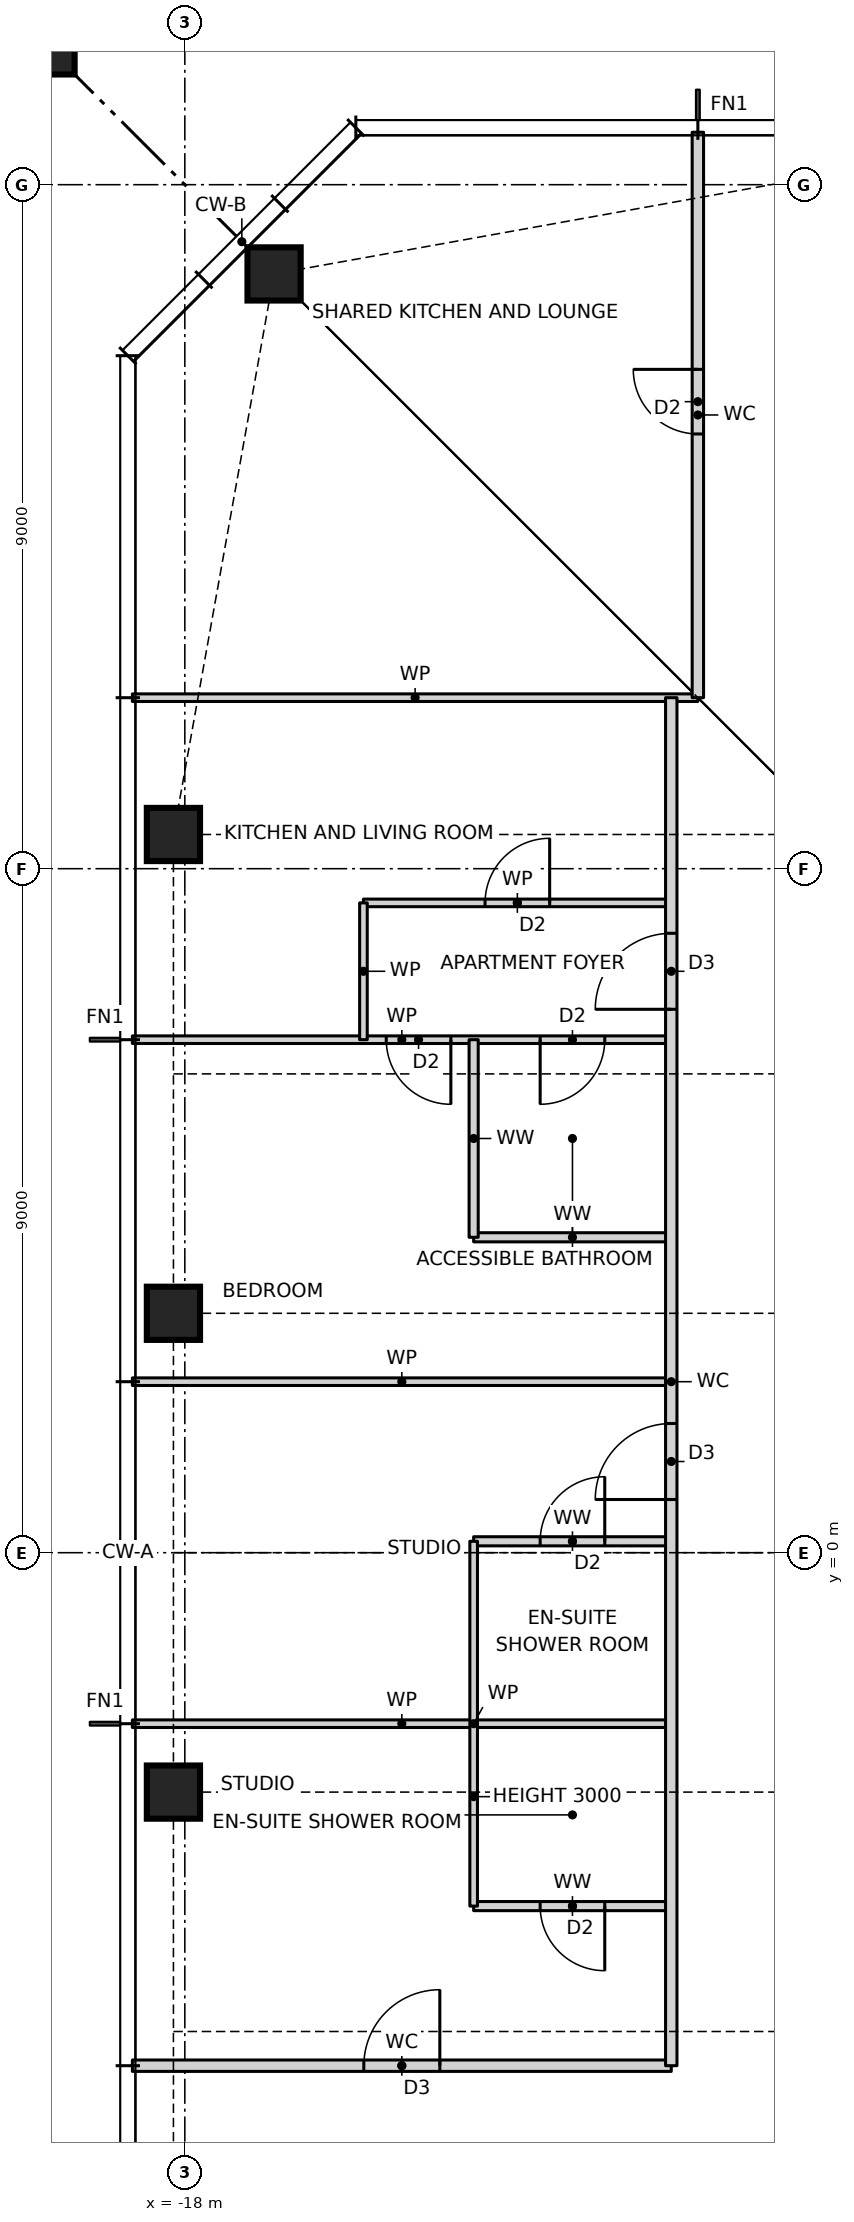
"""IFC4 building model, lengths in metres.
Left out: names, types, materials, properties, quantities, classifications, styles, units other than length and angle.
Written with IfcOpenShell. Run it as: python <this file> out.ifc"""

import sys

from ifc_helpers import new_model, si_unit, direction, frame, frame_2d, origin, origin_2d, place, context, subcontext, project, spatial, rectangle, hollow_rectangle, i_section, extrude, element, fill, save


model = new_model("IFC4")
c1 = context("Model", 3, precision=1e-05, world=origin(), true_north=direction((0.0, 1.0)))
c2 = subcontext(c1, "Body", "Model", "MODEL_VIEW")
j1 = project(units=[si_unit("LENGTHUNIT", "METRE"), si_unit("PLANEANGLEUNIT", "RADIAN")], contexts=[c1])
p1 = place(None, origin())
s1 = spatial("IfcSite", under=j1, at=p1, CompositionType="ELEMENT")
p2 = place(p1, origin())
s2 = spatial("IfcBuilding", under=s1, at=p2, CompositionType="ELEMENT")
p3 = place(p2, frame((0.0, 0.0, 202.0)))
s3 = spatial("IfcBuildingStorey", under=s2, at=p3, CompositionType="ELEMENT", Elevation=202.0)
for number, where, z_axis, x_axis in (
    (1, (-16.826, 16.826, 0.0), (0.0, 0.0, 1.0), (1.0, 0.0, 0.0)),
    (2, (-18.15, 9.45, 0.0), (0.0, 0.0, 1.0), (1.0, 0.0, 0.0)),
    (3, (-18.15, 3.15, 0.0), (0.0, 0.0, 1.0), (1.0, 0.0, 0.0)),
    (4, (-18.15, -3.15, 0.0), (0.0, 0.0, 1.0), (1.0, 0.0, 0.0)),
):
    element("IfcColumn", number, at=place(p3, frame(where, z_axis=z_axis, x_axis=x_axis)), inside=s3, PredefinedType="COLUMN", context=c2, shape_type="SweptSolid", body=[
        extrude(hollow_rectangle(XDim=0.7, YDim=0.7, WallThickness=0.06, at=origin_2d()), origin(), (0.0, 0.0, 1.0), 3.5),
    ])
p4 = place(p3, frame((-21.65, 21.65, 0.0), z_axis=(0.0, 0.0, 1.0), x_axis=(1.0, 0.0, 0.0)))
e5 = element("IfcColumn", 5, at=p4, inside=s3, PredefinedType="COLUMN", context=c2, shape_type="SweptSolid", body=[
    extrude(rectangle(XDim=4.4, YDim=4.4, at=origin_2d()), origin(), (0.0, 0.0, 1.0), 3.5),
    extrude(i_section(OverallWidth=0.478, OverallDepth=0.599, WebThickness=0.1, FlangeThickness=0.14, at=origin_2d()), origin(), (0.0, 0.0, 1.0), 3.5),
])
p5 = place(p3, frame((-18.69, -6.75, 0.0), z_axis=(0.0, 0.0, 1.0), x_axis=(1.0, 0.0, 0.0)))
e6 = element("IfcWall", 6, at=p5, inside=s3, PredefinedType="PARTITIONING", context=c2, shape_type="SweptSolid", body=[
    extrude(rectangle(XDim=7.09, YDim=0.15, at=frame_2d((3.545, 0.0))), origin(), (0.0, 0.0, 1.0), 3.27),
])
p6 = place(p5, frame((3.045, 0.0, 0.0)))
e7 = element("IfcOpeningElement", 7, at=p6, cuts=e6, PredefinedType="OPENING", context=c2, shape_type="SweptSolid", body=[
    extrude(rectangle(XDim=1.0, YDim=2.1, at=frame_2d((0.5, 1.05))), frame((0.0, 0.085, 0.0), z_axis=(0.0, -1.0, 0.0), x_axis=(1.0, 0.0, 0.0)), (0.0, 0.0, 1.0), 0.17),
])
p7 = place(p3, frame((-14.2, -4.65, 0.0), z_axis=(0.0, 0.0, 1.0), x_axis=(1.0, 0.0, 0.0)))
e8 = element("IfcWall", 8, at=p7, inside=s3, PredefinedType="PARTITIONING", context=c2, shape_type="SweptSolid", body=[
    extrude(rectangle(XDim=2.6, YDim=0.12, at=frame_2d((1.3, 0.0))), origin(), (0.0, 0.0, 1.0), 3.27),
])
p8 = place(p7, frame((0.875, 0.0, 0.0)))
e9 = element("IfcOpeningElement", 9, at=p8, cuts=e8, PredefinedType="OPENING", context=c2, shape_type="SweptSolid", body=[
    extrude(rectangle(XDim=0.85, YDim=2.1, at=frame_2d((0.425, 1.05))), frame((0.0, 0.07, 0.0), z_axis=(0.0, -1.0, 0.0), x_axis=(1.0, 0.0, 0.0)), (0.0, 0.0, 1.0), 0.14),
])
p9 = place(p3, frame((-18.69, -2.25, 0.0), z_axis=(0.0, 0.0, 1.0), x_axis=(1.0, 0.0, 0.0)))
e10 = element("IfcWall", 10, at=p9, inside=s3, PredefinedType="PARTITIONING", context=c2, shape_type="SweptSolid", body=[
    extrude(rectangle(XDim=7.09, YDim=0.1, at=frame_2d((3.545, 0.0))), origin(), (0.0, 0.0, 1.0), 3.27),
])
p10 = place(p3, frame((-14.2, 0.15, 0.0), z_axis=(0.0, 0.0, 1.0), x_axis=(1.0, 0.0, 0.0)))
e11 = element("IfcWall", 11, at=p10, inside=s3, PredefinedType="PARTITIONING", context=c2, shape_type="SweptSolid", body=[
    extrude(rectangle(XDim=2.6, YDim=0.12, at=frame_2d((1.3, 0.0))), origin(), (0.0, 0.0, 1.0), 3.27),
])
p11 = place(p10, frame((0.875, 0.0, 0.0)))
e12 = element("IfcOpeningElement", 12, at=p11, cuts=e11, PredefinedType="OPENING", context=c2, shape_type="SweptSolid", body=[
    extrude(rectangle(XDim=0.85, YDim=2.1, at=frame_2d((0.425, 1.05))), frame((0.0, 0.07, 0.0), z_axis=(0.0, -1.0, 0.0), x_axis=(1.0, 0.0, 0.0)), (0.0, 0.0, 1.0), 0.14),
])
p12 = place(p3, frame((-18.69, 2.25, 0.0), z_axis=(0.0, 0.0, 1.0), x_axis=(1.0, 0.0, 0.0)))
e13 = element("IfcWall", 13, at=p12, inside=s3, PredefinedType="PARTITIONING", context=c2, shape_type="SweptSolid", body=[
    extrude(rectangle(XDim=7.09, YDim=0.1, at=frame_2d((3.545, 0.0))), origin(), (0.0, 0.0, 1.0), 3.27),
])
p13 = place(p3, frame((-14.2, 4.15, 0.0), z_axis=(0.0, 0.0, 1.0), x_axis=(1.0, 0.0, 0.0)))
e14 = element("IfcWall", 14, at=p13, inside=s3, PredefinedType="PARTITIONING", context=c2, shape_type="SweptSolid", body=[
    extrude(rectangle(XDim=2.6, YDim=0.12, at=frame_2d((1.3, 0.0))), origin(), (0.0, 0.0, 1.0), 3.27),
])
p14 = place(p3, frame((-18.69, 6.75, 0.0), z_axis=(0.0, 0.0, 1.0), x_axis=(1.0, 0.0, 0.0)))
e15 = element("IfcWall", 15, at=p14, inside=s3, PredefinedType="PARTITIONING", context=c2, shape_type="SweptSolid", body=[
    extrude(rectangle(XDim=7.09, YDim=0.1, at=frame_2d((3.545, 0.0))), origin(), (0.0, 0.0, 1.0), 3.27),
])
p15 = place(p14, frame((3.34, 0.0, 0.0)))
e16 = element("IfcOpeningElement", 16, at=p15, cuts=e15, PredefinedType="OPENING", context=c2, shape_type="SweptSolid", body=[
    extrude(rectangle(XDim=0.85, YDim=2.1, at=frame_2d((0.425, 1.05))), frame((0.0, 0.06, 0.0), z_axis=(0.0, -1.0, 0.0), x_axis=(1.0, 0.0, 0.0)), (0.0, 0.0, 1.0), 0.12),
])
p16 = place(p14, frame((5.365, 0.0, 0.0)))
e17 = element("IfcOpeningElement", 17, at=p16, cuts=e15, PredefinedType="OPENING", context=c2, shape_type="SweptSolid", body=[
    extrude(rectangle(XDim=0.85, YDim=2.1, at=frame_2d((0.425, 1.05))), frame((0.0, 0.06, 0.0), z_axis=(0.0, -1.0, 0.0), x_axis=(1.0, 0.0, 0.0)), (0.0, 0.0, 1.0), 0.12),
])
p17 = place(p3, frame((-15.65, 8.55, 0.0), z_axis=(0.0, 0.0, 1.0), x_axis=(1.0, 0.0, 0.0)))
e18 = element("IfcWall", 18, at=p17, inside=s3, PredefinedType="PARTITIONING", context=c2, shape_type="SweptSolid", body=[
    extrude(rectangle(XDim=4.05, YDim=0.1, at=frame_2d((2.025, 0.0))), origin(), (0.0, 0.0, 1.0), 3.27),
])
p18 = place(p17, frame((1.6, 0.0, 0.0)))
e19 = element("IfcOpeningElement", 19, at=p18, cuts=e18, PredefinedType="OPENING", context=c2, shape_type="SweptSolid", body=[
    extrude(rectangle(XDim=0.85, YDim=2.1, at=frame_2d((0.425, 1.05))), frame((0.0, 0.06, 0.0), z_axis=(0.0, -1.0, 0.0), x_axis=(1.0, 0.0, 0.0)), (0.0, 0.0, 1.0), 0.12),
])
p19 = place(p3, frame((-18.69, 11.25, 0.0), z_axis=(0.0, 0.0, 1.0), x_axis=(1.0, 0.0, 0.0)))
e20 = element("IfcWall", 20, at=p19, inside=s3, PredefinedType="PARTITIONING", context=c2, shape_type="SweptSolid", body=[
    extrude(rectangle(XDim=7.44, YDim=0.1, at=frame_2d((3.72, 0.0))), origin(), (0.0, 0.0, 1.0), 3.27),
])
p20 = place(p3, frame((-11.25, 11.25, 0.0), z_axis=(0.0, 0.0, 1.0), x_axis=(0.0, 1.0, 0.0)))
e21 = element("IfcWall", 21, at=p20, inside=s3, PredefinedType="PARTITIONING", context=c2, shape_type="SweptSolid", body=[
    extrude(rectangle(XDim=7.44, YDim=0.15, at=frame_2d((3.72, 0.0))), origin(), (0.0, 0.0, 1.0), 3.27),
])
p21 = place(p20, frame((3.47, 0.0, 0.0)))
e22 = element("IfcOpeningElement", 22, at=p21, cuts=e21, PredefinedType="OPENING", context=c2, shape_type="SweptSolid", body=[
    extrude(rectangle(XDim=0.85, YDim=2.1, at=frame_2d((0.425, 1.05))), frame((0.0, 0.085, 0.0), z_axis=(0.0, -1.0, 0.0), x_axis=(1.0, 0.0, 0.0)), (0.0, 0.0, 1.0), 0.17),
])
p22 = place(p3, frame((-11.6, -6.75, 0.0), z_axis=(0.0, 0.0, 1.0), x_axis=(0.0, 1.0, 0.0)))
e23 = element("IfcWall", 23, at=p22, inside=s3, PredefinedType="PARTITIONING", context=c2, shape_type="SweptSolid", body=[
    extrude(rectangle(XDim=18.0, YDim=0.15, at=frame_2d((9.0, 0.0))), origin(), (0.0, 0.0, 1.0), 3.27),
])
p23 = place(p22, frame((13.9, 0.0, 0.0)))
e24 = element("IfcOpeningElement", 24, at=p23, cuts=e23, PredefinedType="OPENING", context=c2, shape_type="SweptSolid", body=[
    extrude(rectangle(XDim=1.0, YDim=2.1, at=frame_2d((0.5, 1.05))), frame((0.0, 0.085, 0.0), z_axis=(0.0, -1.0, 0.0), x_axis=(1.0, 0.0, 0.0)), (0.0, 0.0, 1.0), 0.17),
])
p24 = place(p22, frame((7.45, 0.0, 0.0)))
e25 = element("IfcOpeningElement", 25, at=p24, cuts=e23, PredefinedType="OPENING", context=c2, shape_type="SweptSolid", body=[
    extrude(rectangle(XDim=1.0, YDim=2.1, at=frame_2d((0.5, 1.05))), frame((0.0, 0.085, 0.0), z_axis=(0.0, -1.0, 0.0), x_axis=(1.0, 0.0, 0.0)), (0.0, 0.0, 1.0), 0.17),
])
p25 = place(p3, frame((-14.2, -4.65, 0.0), z_axis=(0.0, 0.0, 1.0), x_axis=(0.0, 1.0, 0.0)))
e26 = element("IfcWall", 26, at=p25, inside=s3, PredefinedType="PARTITIONING", context=c2, shape_type="SweptSolid", body=[
    extrude(rectangle(XDim=4.8, YDim=0.1, at=frame_2d((2.4, 0.0))), origin(), (0.0, 0.0, 1.0), 3.0),
])
p26 = place(p3, frame((-14.2, 4.15, 0.0), z_axis=(0.0, 0.0, 1.0), x_axis=(0.0, 1.0, 0.0)))
e27 = element("IfcWall", 27, at=p26, inside=s3, PredefinedType="PARTITIONING", context=c2, shape_type="SweptSolid", body=[
    extrude(rectangle(XDim=2.6, YDim=0.12, at=frame_2d((1.3, 0.0))), origin(), (0.0, 0.0, 1.0), 3.27),
])
p27 = place(p3, frame((-15.65, 6.75, 0.0), z_axis=(0.0, 0.0, 1.0), x_axis=(0.0, 1.0, 0.0)))
e28 = element("IfcWall", 28, at=p27, inside=s3, PredefinedType="PARTITIONING", context=c2, shape_type="SweptSolid", body=[
    extrude(rectangle(XDim=1.8, YDim=0.1, at=frame_2d((0.9, 0.0))), origin(), (0.0, 0.0, 1.0), 3.27),
])
p28 = place(p23, origin())
e29 = element("IfcDoor", 29, at=p28, inside=s3, OperationType="SINGLE_SWING_LEFT", PredefinedType="DOOR", context=c2, shape_type="SweptSolid", body=[
    extrude(rectangle(XDim=1.0, YDim=2.1, at=frame_2d((0.5, 1.05))), frame((0.0, 0.025, 0.0), z_axis=(0.0, -1.0, 0.0), x_axis=(1.0, 0.0, 0.0)), (0.0, 0.0, 1.0), 0.05),
])
fill(e24, e29)
p29 = place(p18, origin())
e30 = element("IfcDoor", 30, at=p29, inside=s3, OperationType="SINGLE_SWING_RIGHT", PredefinedType="DOOR", context=c2, shape_type="SweptSolid", body=[
    extrude(rectangle(XDim=0.85, YDim=2.1, at=frame_2d((0.425, 1.05))), frame((0.0, 0.025, 0.0), z_axis=(0.0, -1.0, 0.0), x_axis=(1.0, 0.0, 0.0)), (0.0, 0.0, 1.0), 0.05),
])
fill(e19, e30)
p30 = place(p15, frame((0.85, 0.0, 0.0), z_axis=(0.0, 0.0, 1.0), x_axis=(-1.0, 0.0, 0.0)))
e31 = element("IfcDoor", 31, at=p30, inside=s3, OperationType="SINGLE_SWING_LEFT", PredefinedType="DOOR", context=c2, shape_type="SweptSolid", body=[
    extrude(rectangle(XDim=0.85, YDim=2.1, at=frame_2d((0.425, 1.05))), frame((0.0, 0.025, 0.0), z_axis=(0.0, -1.0, 0.0), x_axis=(1.0, 0.0, 0.0)), (0.0, 0.0, 1.0), 0.05),
])
fill(e16, e31)
p31 = place(p16, frame((0.85, 0.0, 0.0), z_axis=(0.0, 0.0, 1.0), x_axis=(-1.0, 0.0, 0.0)))
e32 = element("IfcDoor", 32, at=p31, inside=s3, OperationType="SINGLE_SWING_RIGHT", PredefinedType="DOOR", context=c2, shape_type="SweptSolid", body=[
    extrude(rectangle(XDim=0.85, YDim=2.1, at=frame_2d((0.425, 1.05))), frame((0.0, 0.025, 0.0), z_axis=(0.0, -1.0, 0.0), x_axis=(1.0, 0.0, 0.0)), (0.0, 0.0, 1.0), 0.05),
])
fill(e17, e32)
p32 = place(p24, origin())
e33 = element("IfcDoor", 33, at=p32, inside=s3, OperationType="SINGLE_SWING_LEFT", PredefinedType="DOOR", context=c2, shape_type="SweptSolid", body=[
    extrude(rectangle(XDim=1.0, YDim=2.1, at=frame_2d((0.5, 1.05))), frame((0.0, 0.025, 0.0), z_axis=(0.0, -1.0, 0.0), x_axis=(1.0, 0.0, 0.0)), (0.0, 0.0, 1.0), 0.05),
])
fill(e25, e33)
p33 = place(p11, origin())
e34 = element("IfcDoor", 34, at=p33, inside=s3, OperationType="SINGLE_SWING_RIGHT", PredefinedType="DOOR", context=c2, shape_type="SweptSolid", body=[
    extrude(rectangle(XDim=0.85, YDim=2.1, at=frame_2d((0.425, 1.05))), frame((0.0, 0.025, 0.0), z_axis=(0.0, -1.0, 0.0), x_axis=(1.0, 0.0, 0.0)), (0.0, 0.0, 1.0), 0.05),
])
fill(e12, e34)
p34 = place(p6, origin())
e35 = element("IfcDoor", 35, at=p34, inside=s3, OperationType="SINGLE_SWING_RIGHT", PredefinedType="DOOR", context=c2, shape_type="SweptSolid", body=[
    extrude(rectangle(XDim=1.0, YDim=2.1, at=frame_2d((0.5, 1.05))), frame((0.0, 0.025, 0.0), z_axis=(0.0, -1.0, 0.0), x_axis=(1.0, 0.0, 0.0)), (0.0, 0.0, 1.0), 0.05),
])
fill(e7, e35)
p35 = place(p8, frame((0.85, 0.0, 0.0), z_axis=(0.0, 0.0, 1.0), x_axis=(-1.0, 0.0, 0.0)))
e36 = element("IfcDoor", 36, at=p35, inside=s3, OperationType="SINGLE_SWING_LEFT", PredefinedType="DOOR", context=c2, shape_type="SweptSolid", body=[
    extrude(rectangle(XDim=0.85, YDim=2.1, at=frame_2d((0.425, 1.05))), frame((0.0, 0.025, 0.0), z_axis=(0.0, -1.0, 0.0), x_axis=(1.0, 0.0, 0.0)), (0.0, 0.0, 1.0), 0.05),
])
fill(e9, e36)
p36 = place(p21, origin())
e37 = element("IfcDoor", 37, at=p36, inside=s3, OperationType="SINGLE_SWING_RIGHT", PredefinedType="DOOR", context=c2, shape_type="SweptSolid", body=[
    extrude(rectangle(XDim=0.85, YDim=2.1, at=frame_2d((0.425, 1.05))), frame((0.0, 0.025, 0.0), z_axis=(0.0, -1.0, 0.0), x_axis=(1.0, 0.0, 0.0)), (0.0, 0.0, 1.0), 0.05),
])
fill(e22, e37)
save(model, sys.argv[1])
